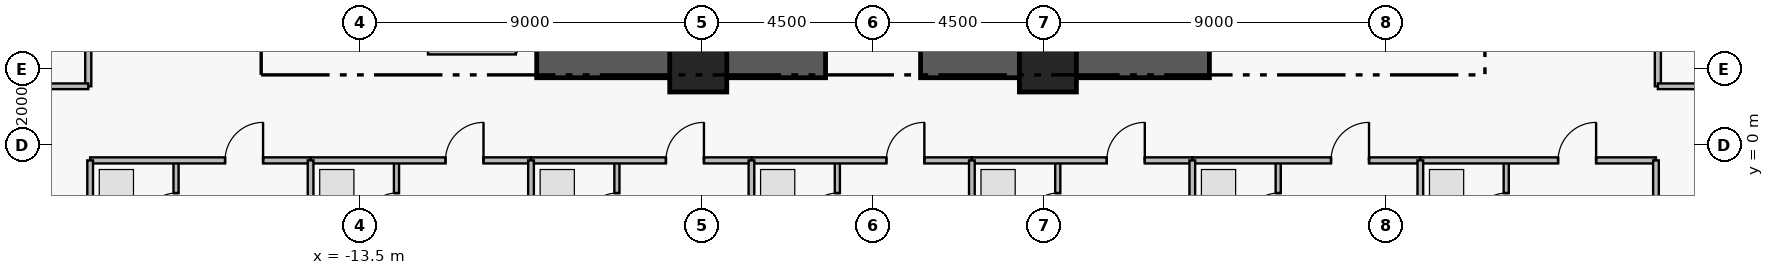
"""IFC4 building model, lengths in metres.
Left out: names, types, materials, properties, quantities, classifications, styles, units other than length and angle.
Written with IfcOpenShell. Run it as: python <this file> out.ifc"""

import sys

from ifc_helpers import new_model, si_unit, direction, frame, frame_2d, origin, origin_2d, place, context, subcontext, project, spatial, rectangle, extrude, element, fill, save


model = new_model("IFC4")
c1 = context("Model", 3, precision=1e-05, world=origin(), true_north=direction((0.0, 1.0)))
c2 = subcontext(c1, "Body", "Model", "MODEL_VIEW")
j1 = project(units=[si_unit("LENGTHUNIT", "METRE"), si_unit("PLANEANGLEUNIT", "RADIAN")], contexts=[c1])
p1 = place(None, origin())
s1 = spatial("IfcSite", under=j1, at=p1, CompositionType="ELEMENT")
p2 = place(p1, origin())
s2 = spatial("IfcBuilding", under=s1, at=p2, CompositionType="ELEMENT")
p3 = place(p2, frame((0.0, 0.0, 150.4)))
s3 = spatial("IfcBuildingStorey", under=s2, at=p3, CompositionType="ELEMENT", Elevation=150.4)
for number, where, z_axis, x_axis in (
    (1, (-8.85, 2.15, 0.0), (0.0, 0.0, 1.0), (1.0, 0.0, 0.0)),
    (2, (1.25, 2.15, 0.0), (0.0, 0.0, 1.0), (1.0, 0.0, 0.0)),
):
    element("IfcWall", number, at=place(p3, frame(where, z_axis=z_axis, x_axis=x_axis)), inside=s3, PredefinedType="SHEAR", context=c2, shape_type="SweptSolid", body=[
        extrude(rectangle(XDim=7.6, YDim=0.75, at=frame_2d((3.8, 0.0))), origin(), (0.0, 0.0, 1.0), 3.43),
    ])
for number, where, z_axis, x_axis in (
    (3, (-4.6, 2.15, 0.0), (0.0, 0.0, 1.0), (1.0, 0.0, 0.0)),
    (4, (4.6, 2.15, 0.0), (0.0, 0.0, 1.0), (1.0, 0.0, 0.0)),
):
    element("IfcColumn", number, at=place(p3, frame(where, z_axis=z_axis, x_axis=x_axis)), inside=s3, PredefinedType="COLUMN", context=c2, shape_type="SweptSolid", body=[
        extrude(rectangle(XDim=1.5, YDim=1.5, at=origin_2d()), origin(), (0.0, 0.0, 1.0), 3.65),
    ])
p4 = place(p3, frame((-18.34, -2.76, 0.0), z_axis=(0.0, 0.0, 1.0), x_axis=(0.0, 1.0, 0.0)))
e5 = element("IfcWall", 5, at=p4, inside=s3, PredefinedType="PLUMBINGWALL", context=c2, shape_type="SweptSolid", body=[
    extrude(rectangle(XDim=2.36, YDim=0.135, at=frame_2d((1.18, 0.0))), origin(), (0.0, 0.0, 1.0), 3.43),
])
p5 = place(p4, frame((0.65, 0.0, 0.0)))
e6 = element("IfcOpeningElement", 6, at=p5, cuts=e5, PredefinedType="OPENING", context=c2, shape_type="SweptSolid", body=[
    extrude(rectangle(XDim=0.85, YDim=2.1, at=frame_2d((0.425, 1.05))), frame((0.0, 0.077, 0.0), z_axis=(0.0, -1.0, 0.0), x_axis=(1.0, 0.0, 0.0)), (0.0, 0.0, 1.0), 0.155),
])
p6 = place(p3, frame((-20.6, -0.4, 0.0), z_axis=(0.0, 0.0, 1.0), x_axis=(1.0, 0.0, 0.0)))
e7 = element("IfcWall", 7, at=p6, inside=s3, PredefinedType="PARTITIONING", context=c2, shape_type="SweptSolid", body=[
    extrude(rectangle(XDim=5.8, YDim=0.16, at=frame_2d((2.9, 0.0))), origin(), (0.0, 0.0, 1.0), 3.43),
])
p7 = place(p6, frame((3.55, 0.0, 0.0)))
e8 = element("IfcOpeningElement", 8, at=p7, cuts=e7, PredefinedType="OPENING", context=c2, shape_type="SweptSolid", body=[
    extrude(rectangle(XDim=1.0, YDim=2.15, at=frame_2d((0.5, 1.075))), frame((0.0, 0.09, 0.0), z_axis=(0.0, -1.0, 0.0), x_axis=(1.0, 0.0, 0.0)), (0.0, 0.0, 1.0), 0.18),
])
p8 = place(p3, frame((-12.54, -2.76, 0.0), z_axis=(0.0, 0.0, 1.0), x_axis=(0.0, 1.0, 0.0)))
e9 = element("IfcWall", 9, at=p8, inside=s3, PredefinedType="PLUMBINGWALL", context=c2, shape_type="SweptSolid", body=[
    extrude(rectangle(XDim=2.36, YDim=0.135, at=frame_2d((1.18, 0.0))), origin(), (0.0, 0.0, 1.0), 3.43),
])
p9 = place(p8, frame((0.65, 0.0, 0.0)))
e10 = element("IfcOpeningElement", 10, at=p9, cuts=e9, PredefinedType="OPENING", context=c2, shape_type="SweptSolid", body=[
    extrude(rectangle(XDim=0.85, YDim=2.1, at=frame_2d((0.425, 1.05))), frame((0.0, 0.077, 0.0), z_axis=(0.0, -1.0, 0.0), x_axis=(1.0, 0.0, 0.0)), (0.0, 0.0, 1.0), 0.155),
])
p10 = place(p3, frame((-14.8, -0.4, 0.0), z_axis=(0.0, 0.0, 1.0), x_axis=(1.0, 0.0, 0.0)))
e11 = element("IfcWall", 11, at=p10, inside=s3, PredefinedType="PARTITIONING", context=c2, shape_type="SweptSolid", body=[
    extrude(rectangle(XDim=5.8, YDim=0.16, at=frame_2d((2.9, 0.0))), origin(), (0.0, 0.0, 1.0), 3.43),
])
p11 = place(p10, frame((3.55, 0.0, 0.0)))
e12 = element("IfcOpeningElement", 12, at=p11, cuts=e11, PredefinedType="OPENING", context=c2, shape_type="SweptSolid", body=[
    extrude(rectangle(XDim=1.0, YDim=2.15, at=frame_2d((0.5, 1.075))), frame((0.0, 0.09, 0.0), z_axis=(0.0, -1.0, 0.0), x_axis=(1.0, 0.0, 0.0)), (0.0, 0.0, 1.0), 0.18),
])
p12 = place(p3, frame((-6.74, -2.76, 0.0), z_axis=(0.0, 0.0, 1.0), x_axis=(0.0, 1.0, 0.0)))
e13 = element("IfcWall", 13, at=p12, inside=s3, PredefinedType="PLUMBINGWALL", context=c2, shape_type="SweptSolid", body=[
    extrude(rectangle(XDim=2.36, YDim=0.135, at=frame_2d((1.18, 0.0))), origin(), (0.0, 0.0, 1.0), 3.43),
])
p13 = place(p12, frame((0.65, 0.0, 0.0)))
e14 = element("IfcOpeningElement", 14, at=p13, cuts=e13, PredefinedType="OPENING", context=c2, shape_type="SweptSolid", body=[
    extrude(rectangle(XDim=0.85, YDim=2.1, at=frame_2d((0.425, 1.05))), frame((0.0, 0.077, 0.0), z_axis=(0.0, -1.0, 0.0), x_axis=(1.0, 0.0, 0.0)), (0.0, 0.0, 1.0), 0.155),
])
p14 = place(p3, frame((-9.0, -0.4, 0.0), z_axis=(0.0, 0.0, 1.0), x_axis=(1.0, 0.0, 0.0)))
e15 = element("IfcWall", 15, at=p14, inside=s3, PredefinedType="PARTITIONING", context=c2, shape_type="SweptSolid", body=[
    extrude(rectangle(XDim=5.8, YDim=0.16, at=frame_2d((2.9, 0.0))), origin(), (0.0, 0.0, 1.0), 3.43),
])
p15 = place(p14, frame((3.55, 0.0, 0.0)))
e16 = element("IfcOpeningElement", 16, at=p15, cuts=e15, PredefinedType="OPENING", context=c2, shape_type="SweptSolid", body=[
    extrude(rectangle(XDim=1.0, YDim=2.15, at=frame_2d((0.5, 1.075))), frame((0.0, 0.09, 0.0), z_axis=(0.0, -1.0, 0.0), x_axis=(1.0, 0.0, 0.0)), (0.0, 0.0, 1.0), 0.18),
])
p16 = place(p3, frame((-0.94, -2.76, 0.0), z_axis=(0.0, 0.0, 1.0), x_axis=(0.0, 1.0, 0.0)))
e17 = element("IfcWall", 17, at=p16, inside=s3, PredefinedType="PLUMBINGWALL", context=c2, shape_type="SweptSolid", body=[
    extrude(rectangle(XDim=2.36, YDim=0.135, at=frame_2d((1.18, 0.0))), origin(), (0.0, 0.0, 1.0), 3.43),
])
p17 = place(p16, frame((0.65, 0.0, 0.0)))
e18 = element("IfcOpeningElement", 18, at=p17, cuts=e17, PredefinedType="OPENING", context=c2, shape_type="SweptSolid", body=[
    extrude(rectangle(XDim=0.85, YDim=2.1, at=frame_2d((0.425, 1.05))), frame((0.0, 0.077, 0.0), z_axis=(0.0, -1.0, 0.0), x_axis=(1.0, 0.0, 0.0)), (0.0, 0.0, 1.0), 0.155),
])
p18 = place(p3, frame((-3.2, -0.4, 0.0), z_axis=(0.0, 0.0, 1.0), x_axis=(1.0, 0.0, 0.0)))
e19 = element("IfcWall", 19, at=p18, inside=s3, PredefinedType="PARTITIONING", context=c2, shape_type="SweptSolid", body=[
    extrude(rectangle(XDim=5.8, YDim=0.16, at=frame_2d((2.9, 0.0))), origin(), (0.0, 0.0, 1.0), 3.43),
])
p19 = place(p18, frame((3.55, 0.0, 0.0)))
e20 = element("IfcOpeningElement", 20, at=p19, cuts=e19, PredefinedType="OPENING", context=c2, shape_type="SweptSolid", body=[
    extrude(rectangle(XDim=1.0, YDim=2.15, at=frame_2d((0.5, 1.075))), frame((0.0, 0.09, 0.0), z_axis=(0.0, -1.0, 0.0), x_axis=(1.0, 0.0, 0.0)), (0.0, 0.0, 1.0), 0.18),
])
p20 = place(p3, frame((4.86, -2.76, 0.0), z_axis=(0.0, 0.0, 1.0), x_axis=(0.0, 1.0, 0.0)))
e21 = element("IfcWall", 21, at=p20, inside=s3, PredefinedType="PLUMBINGWALL", context=c2, shape_type="SweptSolid", body=[
    extrude(rectangle(XDim=2.36, YDim=0.135, at=frame_2d((1.18, 0.0))), origin(), (0.0, 0.0, 1.0), 2.747),
])
p21 = place(p20, frame((0.65, 0.0, 0.0)))
e22 = element("IfcOpeningElement", 22, at=p21, cuts=e21, PredefinedType="OPENING", context=c2, shape_type="SweptSolid", body=[
    extrude(rectangle(XDim=0.85, YDim=2.1, at=frame_2d((0.425, 1.05))), frame((0.0, 0.077, 0.0), z_axis=(0.0, -1.0, 0.0), x_axis=(1.0, 0.0, 0.0)), (0.0, 0.0, 1.0), 0.155),
])
p22 = place(p3, frame((2.6, -0.4, 0.0), z_axis=(0.0, 0.0, 1.0), x_axis=(1.0, 0.0, 0.0)))
e23 = element("IfcWall", 23, at=p22, inside=s3, PredefinedType="PARTITIONING", context=c2, shape_type="SweptSolid", body=[
    extrude(rectangle(XDim=5.8, YDim=0.16, at=frame_2d((2.9, 0.0))), origin(), (0.0, 0.0, 1.0), 3.43),
])
p23 = place(p22, frame((3.55, 0.0, 0.0)))
e24 = element("IfcOpeningElement", 24, at=p23, cuts=e23, PredefinedType="OPENING", context=c2, shape_type="SweptSolid", body=[
    extrude(rectangle(XDim=1.0, YDim=2.15, at=frame_2d((0.5, 1.075))), frame((0.0, 0.09, 0.0), z_axis=(0.0, -1.0, 0.0), x_axis=(1.0, 0.0, 0.0)), (0.0, 0.0, 1.0), 0.18),
])
p24 = place(p3, frame((10.66, -2.76, 0.0), z_axis=(0.0, 0.0, 1.0), x_axis=(0.0, 1.0, 0.0)))
e25 = element("IfcWall", 25, at=p24, inside=s3, PredefinedType="PLUMBINGWALL", context=c2, shape_type="SweptSolid", body=[
    extrude(rectangle(XDim=2.36, YDim=0.135, at=frame_2d((1.18, 0.0))), origin(), (0.0, 0.0, 1.0), 3.43),
])
p25 = place(p24, frame((0.65, 0.0, 0.0)))
e26 = element("IfcOpeningElement", 26, at=p25, cuts=e25, PredefinedType="OPENING", context=c2, shape_type="SweptSolid", body=[
    extrude(rectangle(XDim=0.85, YDim=2.1, at=frame_2d((0.425, 1.05))), frame((0.0, 0.077, 0.0), z_axis=(0.0, -1.0, 0.0), x_axis=(1.0, 0.0, 0.0)), (0.0, 0.0, 1.0), 0.155),
])
p26 = place(p3, frame((8.4, -0.4, 0.0), z_axis=(0.0, 0.0, 1.0), x_axis=(1.0, 0.0, 0.0)))
e27 = element("IfcWall", 27, at=p26, inside=s3, PredefinedType="PARTITIONING", context=c2, shape_type="SweptSolid", body=[
    extrude(rectangle(XDim=6.0, YDim=0.16, at=frame_2d((3.0, 0.0))), origin(), (0.0, 0.0, 1.0), 3.43),
])
p27 = place(p26, frame((3.65, 0.0, 0.0)))
e28 = element("IfcOpeningElement", 28, at=p27, cuts=e27, PredefinedType="OPENING", context=c2, shape_type="SweptSolid", body=[
    extrude(rectangle(XDim=1.0, YDim=2.15, at=frame_2d((0.5, 1.075))), frame((0.0, 0.09, 0.0), z_axis=(0.0, -1.0, 0.0), x_axis=(1.0, 0.0, 0.0)), (0.0, 0.0, 1.0), 0.18),
])
p28 = place(p3, frame((16.66, -2.76, 0.0), z_axis=(0.0, 0.0, 1.0), x_axis=(0.0, 1.0, 0.0)))
e29 = element("IfcWall", 29, at=p28, inside=s3, PredefinedType="PLUMBINGWALL", context=c2, shape_type="SweptSolid", body=[
    extrude(rectangle(XDim=2.36, YDim=0.135, at=frame_2d((1.18, 0.0))), origin(), (0.0, 0.0, 1.0), 3.43),
])
p29 = place(p28, frame((0.65, 0.0, 0.0)))
e30 = element("IfcOpeningElement", 30, at=p29, cuts=e29, PredefinedType="OPENING", context=c2, shape_type="SweptSolid", body=[
    extrude(rectangle(XDim=0.85, YDim=2.1, at=frame_2d((0.425, 1.05))), frame((0.0, 0.077, 0.0), z_axis=(0.0, -1.0, 0.0), x_axis=(1.0, 0.0, 0.0)), (0.0, 0.0, 1.0), 0.155),
])
p30 = place(p3, frame((14.4, -0.4, 0.0), z_axis=(0.0, 0.0, 1.0), x_axis=(1.0, 0.0, 0.0)))
e31 = element("IfcWall", 31, at=p30, inside=s3, PredefinedType="PARTITIONING", context=c2, shape_type="SweptSolid", body=[
    extrude(rectangle(XDim=6.2, YDim=0.16, at=frame_2d((3.1, 0.0))), origin(), (0.0, 0.0, 1.0), 3.43),
])
p31 = place(p30, frame((3.625, 0.0, 0.0)))
e32 = element("IfcOpeningElement", 32, at=p31, cuts=e31, PredefinedType="OPENING", context=c2, shape_type="SweptSolid", body=[
    extrude(rectangle(XDim=1.0, YDim=2.15, at=frame_2d((0.5, 1.075))), frame((0.0, 0.09, 0.0), z_axis=(0.0, -1.0, 0.0), x_axis=(1.0, 0.0, 0.0)), (0.0, 0.0, 1.0), 0.18),
])
p32 = place(p3, frame((20.65, 1.55, 0.0), z_axis=(0.0, 0.0, 1.0), x_axis=(0.0, 1.0, 0.0)))
e33 = element("IfcWall", 33, at=p32, inside=s3, PredefinedType="PARTITIONING", context=c2, shape_type="SweptSolid", body=[
    extrude(rectangle(XDim=5.2, YDim=0.16, at=frame_2d((2.6, 0.0))), origin(), (0.0, 0.0, 1.0), 3.43),
])
p33 = place(p32, frame((2.14, 0.0, 0.0)))
e34 = element("IfcOpeningElement", 34, at=p33, cuts=e33, PredefinedType="OPENING", context=c2, shape_type="SweptSolid", body=[
    extrude(rectangle(XDim=0.92, YDim=2.12, at=frame_2d((0.46, 1.06))), frame((0.0, 0.09, 0.0), z_axis=(0.0, -1.0, 0.0), x_axis=(1.0, 0.0, 0.0)), (0.0, 0.0, 1.0), 0.18),
])
p34 = place(p3, frame((-20.65, 1.55, 0.0), z_axis=(0.0, 0.0, 1.0), x_axis=(0.0, 1.0, 0.0)))
e35 = element("IfcWall", 35, at=p34, inside=s3, PredefinedType="PARTITIONING", context=c2, shape_type="SweptSolid", body=[
    extrude(rectangle(XDim=6.35, YDim=0.16, at=frame_2d((3.175, 0.0))), origin(), (0.0, 0.0, 1.0), 3.43),
])
p35 = place(p34, frame((2.7, 0.0, 0.0)))
e36 = element("IfcOpeningElement", 36, at=p35, cuts=e35, PredefinedType="OPENING", context=c2, shape_type="SweptSolid", body=[
    extrude(rectangle(XDim=0.95, YDim=2.15, at=frame_2d((0.475, 1.075))), frame((0.0, 0.09, 0.0), z_axis=(0.0, -1.0, 0.0), x_axis=(1.0, 0.0, 0.0)), (0.0, 0.0, 1.0), 0.18),
])
p36 = place(p3, frame((-11.71, 2.47, 0.0), z_axis=(0.0, 0.0, 1.0), x_axis=(1.0, 0.0, 0.0)))
e37 = element("IfcWall", 37, at=p36, inside=s3, PredefinedType="PARTITIONING", context=c2, shape_type="SweptSolid", body=[
    extrude(rectangle(XDim=2.31, YDim=0.165, at=frame_2d((1.155, 0.0))), origin(), (0.0, 0.0, 1.0), 2.03),
])
p37 = place(p3, frame((-20.6, -11.9, 0.0), z_axis=(0.0, 0.0, 1.0), x_axis=(0.0, 1.0, 0.0)))
e38 = element("IfcWall", 38, at=p37, inside=s3, PredefinedType="PARTITIONING", context=c2, shape_type="SweptSolid", body=[
    extrude(rectangle(XDim=11.5, YDim=0.15, at=frame_2d((5.75, 0.0))), origin(), (0.0, 0.0, 1.0), 3.43),
])
for number, where, z_axis, x_axis in (
    (39, (-14.8, -15.32, 0.0), (0.0, 0.0, 1.0), (0.0, 1.0, 0.0)),
    (40, (-9.0, -15.32, 0.0), (0.0, 0.0, 1.0), (0.0, 1.0, 0.0)),
    (41, (-3.2, -15.32, 0.0), (0.0, 0.0, 1.0), (0.0, 1.0, 0.0)),
    (42, (2.6, -15.32, 0.0), (0.0, 0.0, 1.0), (0.0, 1.0, 0.0)),
    (43, (8.4, -15.32, 0.0), (0.0, 0.0, 1.0), (0.0, 1.0, 0.0)),
    (44, (14.4, -15.32, 0.0), (0.0, 0.0, 1.0), (0.0, 1.0, 0.0)),
):
    element("IfcWall", number, at=place(p3, frame(where, z_axis=z_axis, x_axis=x_axis)), inside=s3, PredefinedType="PARTITIONING", context=c2, shape_type="SweptSolid", body=[
        extrude(rectangle(XDim=14.92, YDim=0.15, at=frame_2d((7.46, 0.0))), origin(), (0.0, 0.0, 1.0), 3.43),
    ])
p38 = place(p3, frame((20.6, -11.9, 0.0), z_axis=(0.0, 0.0, 1.0), x_axis=(0.0, 1.0, 0.0)))
e45 = element("IfcWall", 45, at=p38, inside=s3, PredefinedType="PARTITIONING", context=c2, shape_type="SweptSolid", body=[
    extrude(rectangle(XDim=11.5, YDim=0.15, at=frame_2d((5.75, 0.0))), origin(), (0.0, 0.0, 1.0), 3.43),
])
for number, where, z_axis, x_axis in (
    (46, (20.65, 1.55, 0.0), (0.0, 0.0, 1.0), (1.0, 0.0, 0.0)),
    (47, (-23.867, 1.55, 0.0), (0.0, 0.0, 1.0), (1.0, 0.0, 0.0)),
):
    element("IfcWall", number, at=place(p3, frame(where, z_axis=z_axis, x_axis=x_axis)), inside=s3, PredefinedType="PARTITIONING", context=c2, shape_type="SweptSolid", body=[
        extrude(rectangle(XDim=3.217, YDim=0.15, at=frame_2d((1.608, 0.0))), origin(), (0.0, 0.0, 1.0), 3.43),
    ])
p39 = place(p5, origin())
e48 = element("IfcDoor", 48, at=p39, inside=s3, OperationType="SINGLE_SWING_LEFT", PredefinedType="DOOR", context=c2, shape_type="SweptSolid", body=[
    extrude(rectangle(XDim=0.85, YDim=2.1, at=frame_2d((0.425, 1.05))), frame((0.0, 0.025, 0.0), z_axis=(0.0, -1.0, 0.0), x_axis=(1.0, 0.0, 0.0)), (0.0, 0.0, 1.0), 0.05),
])
fill(e6, e48)
p40 = place(p7, origin())
e49 = element("IfcDoor", 49, at=p40, inside=s3, OperationType="SINGLE_SWING_RIGHT", PredefinedType="DOOR", context=c2, shape_type="SweptSolid", body=[
    extrude(rectangle(XDim=1.0, YDim=2.15, at=frame_2d((0.5, 1.075))), frame((0.0, 0.025, 0.0), z_axis=(0.0, -1.0, 0.0), x_axis=(1.0, 0.0, 0.0)), (0.0, 0.0, 1.0), 0.05),
])
fill(e8, e49)
p41 = place(p9, origin())
e50 = element("IfcDoor", 50, at=p41, inside=s3, OperationType="SINGLE_SWING_LEFT", PredefinedType="DOOR", context=c2, shape_type="SweptSolid", body=[
    extrude(rectangle(XDim=0.85, YDim=2.1, at=frame_2d((0.425, 1.05))), frame((0.0, 0.025, 0.0), z_axis=(0.0, -1.0, 0.0), x_axis=(1.0, 0.0, 0.0)), (0.0, 0.0, 1.0), 0.05),
])
fill(e10, e50)
p42 = place(p11, origin())
e51 = element("IfcDoor", 51, at=p42, inside=s3, OperationType="SINGLE_SWING_RIGHT", PredefinedType="DOOR", context=c2, shape_type="SweptSolid", body=[
    extrude(rectangle(XDim=1.0, YDim=2.15, at=frame_2d((0.5, 1.075))), frame((0.0, 0.025, 0.0), z_axis=(0.0, -1.0, 0.0), x_axis=(1.0, 0.0, 0.0)), (0.0, 0.0, 1.0), 0.05),
])
fill(e12, e51)
p43 = place(p13, origin())
e52 = element("IfcDoor", 52, at=p43, inside=s3, OperationType="SINGLE_SWING_LEFT", PredefinedType="DOOR", context=c2, shape_type="SweptSolid", body=[
    extrude(rectangle(XDim=0.85, YDim=2.1, at=frame_2d((0.425, 1.05))), frame((0.0, 0.025, 0.0), z_axis=(0.0, -1.0, 0.0), x_axis=(1.0, 0.0, 0.0)), (0.0, 0.0, 1.0), 0.05),
])
fill(e14, e52)
p44 = place(p15, origin())
e53 = element("IfcDoor", 53, at=p44, inside=s3, OperationType="SINGLE_SWING_RIGHT", PredefinedType="DOOR", context=c2, shape_type="SweptSolid", body=[
    extrude(rectangle(XDim=1.0, YDim=2.15, at=frame_2d((0.5, 1.075))), frame((0.0, 0.025, 0.0), z_axis=(0.0, -1.0, 0.0), x_axis=(1.0, 0.0, 0.0)), (0.0, 0.0, 1.0), 0.05),
])
fill(e16, e53)
p45 = place(p17, origin())
e54 = element("IfcDoor", 54, at=p45, inside=s3, OperationType="SINGLE_SWING_LEFT", PredefinedType="DOOR", context=c2, shape_type="SweptSolid", body=[
    extrude(rectangle(XDim=0.85, YDim=2.1, at=frame_2d((0.425, 1.05))), frame((0.0, 0.025, 0.0), z_axis=(0.0, -1.0, 0.0), x_axis=(1.0, 0.0, 0.0)), (0.0, 0.0, 1.0), 0.05),
])
fill(e18, e54)
p46 = place(p19, origin())
e55 = element("IfcDoor", 55, at=p46, inside=s3, OperationType="SINGLE_SWING_RIGHT", PredefinedType="DOOR", context=c2, shape_type="SweptSolid", body=[
    extrude(rectangle(XDim=1.0, YDim=2.15, at=frame_2d((0.5, 1.075))), frame((0.0, 0.025, 0.0), z_axis=(0.0, -1.0, 0.0), x_axis=(1.0, 0.0, 0.0)), (0.0, 0.0, 1.0), 0.05),
])
fill(e20, e55)
p47 = place(p21, origin())
e56 = element("IfcDoor", 56, at=p47, inside=s3, OperationType="SINGLE_SWING_LEFT", PredefinedType="DOOR", context=c2, shape_type="SweptSolid", body=[
    extrude(rectangle(XDim=0.85, YDim=2.1, at=frame_2d((0.425, 1.05))), frame((0.0, 0.025, 0.0), z_axis=(0.0, -1.0, 0.0), x_axis=(1.0, 0.0, 0.0)), (0.0, 0.0, 1.0), 0.05),
])
fill(e22, e56)
p48 = place(p23, origin())
e57 = element("IfcDoor", 57, at=p48, inside=s3, OperationType="SINGLE_SWING_RIGHT", PredefinedType="DOOR", context=c2, shape_type="SweptSolid", body=[
    extrude(rectangle(XDim=1.0, YDim=2.15, at=frame_2d((0.5, 1.075))), frame((0.0, 0.025, 0.0), z_axis=(0.0, -1.0, 0.0), x_axis=(1.0, 0.0, 0.0)), (0.0, 0.0, 1.0), 0.05),
])
fill(e24, e57)
p49 = place(p25, origin())
e58 = element("IfcDoor", 58, at=p49, inside=s3, OperationType="SINGLE_SWING_LEFT", PredefinedType="DOOR", context=c2, shape_type="SweptSolid", body=[
    extrude(rectangle(XDim=0.85, YDim=2.1, at=frame_2d((0.425, 1.05))), frame((0.0, 0.025, 0.0), z_axis=(0.0, -1.0, 0.0), x_axis=(1.0, 0.0, 0.0)), (0.0, 0.0, 1.0), 0.05),
])
fill(e26, e58)
p50 = place(p27, origin())
e59 = element("IfcDoor", 59, at=p50, inside=s3, OperationType="SINGLE_SWING_RIGHT", PredefinedType="DOOR", context=c2, shape_type="SweptSolid", body=[
    extrude(rectangle(XDim=1.0, YDim=2.15, at=frame_2d((0.5, 1.075))), frame((0.0, 0.025, 0.0), z_axis=(0.0, -1.0, 0.0), x_axis=(1.0, 0.0, 0.0)), (0.0, 0.0, 1.0), 0.05),
])
fill(e28, e59)
p51 = place(p29, origin())
e60 = element("IfcDoor", 60, at=p51, inside=s3, OperationType="SINGLE_SWING_LEFT", PredefinedType="DOOR", context=c2, shape_type="SweptSolid", body=[
    extrude(rectangle(XDim=0.85, YDim=2.1, at=frame_2d((0.425, 1.05))), frame((0.0, 0.025, 0.0), z_axis=(0.0, -1.0, 0.0), x_axis=(1.0, 0.0, 0.0)), (0.0, 0.0, 1.0), 0.05),
])
fill(e30, e60)
p52 = place(p31, origin())
e61 = element("IfcDoor", 61, at=p52, inside=s3, OperationType="SINGLE_SWING_RIGHT", PredefinedType="DOOR", context=c2, shape_type="SweptSolid", body=[
    extrude(rectangle(XDim=1.0, YDim=2.15, at=frame_2d((0.5, 1.075))), frame((0.0, 0.025, 0.0), z_axis=(0.0, -1.0, 0.0), x_axis=(1.0, 0.0, 0.0)), (0.0, 0.0, 1.0), 0.05),
])
fill(e32, e61)
save(model, sys.argv[1])
